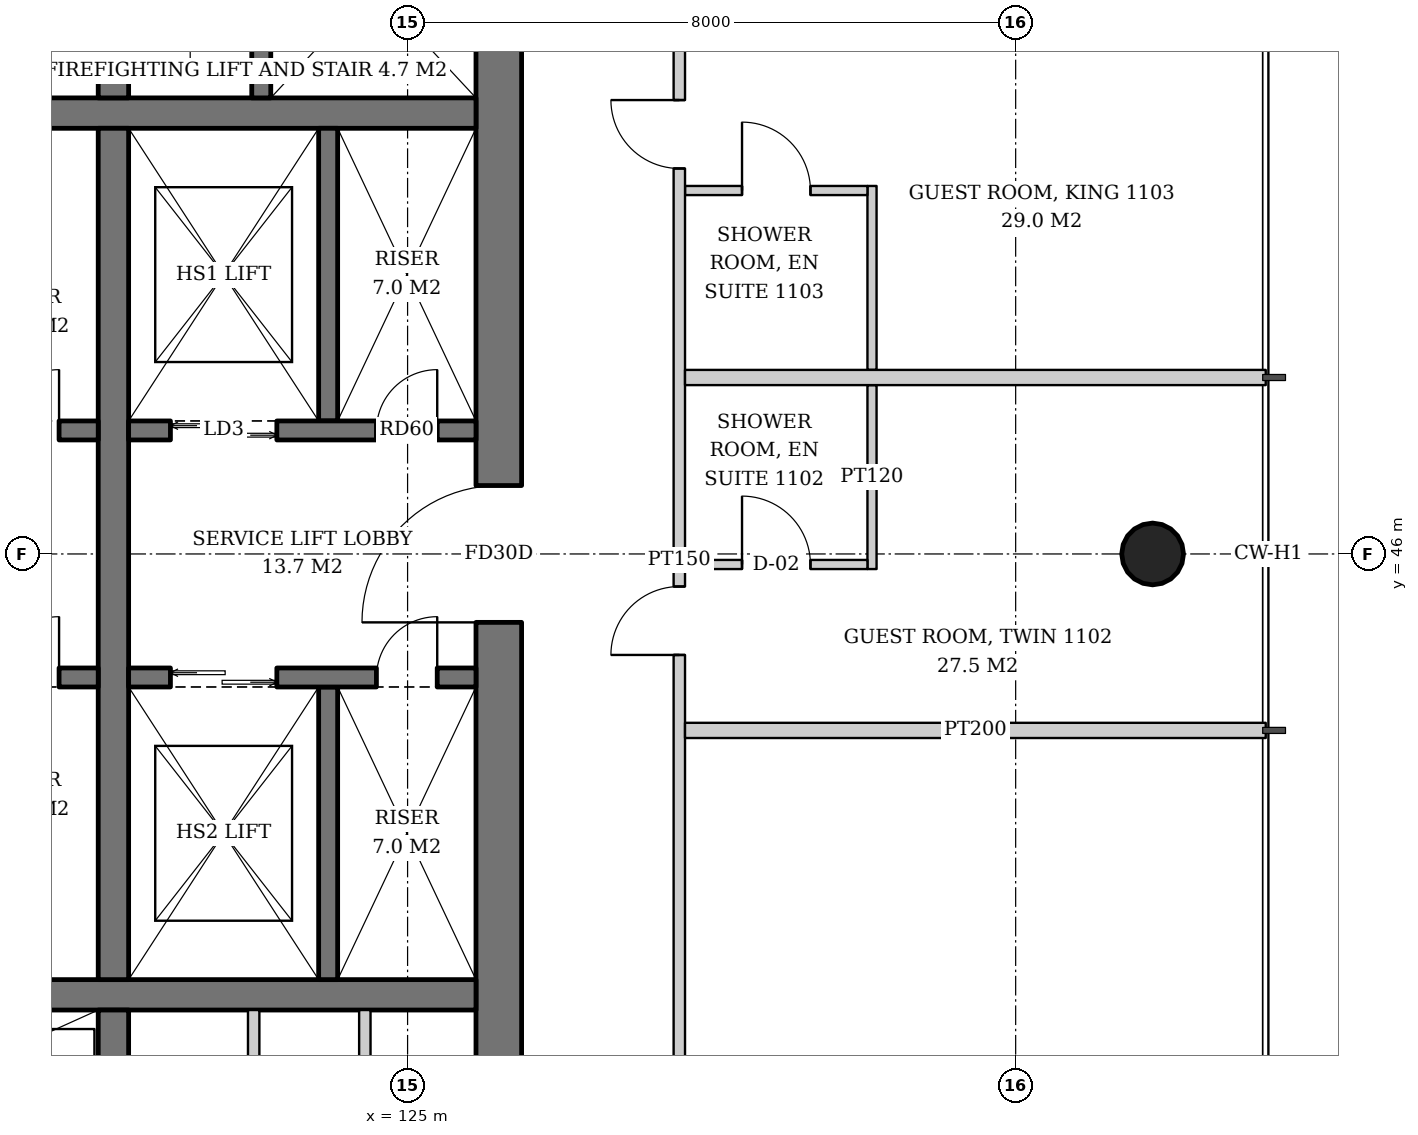
"""IFC4 building model, lengths in metres.
Left out: names, types, materials, properties, quantities, classifications, styles, units other than length and angle.
Written with IfcOpenShell. Run it as: python <this file> out.ifc"""

import sys

from ifc_helpers import new_model, si_unit, direction, frame, frame_2d, origin, origin_2d, place, context, subcontext, project, spatial, rectangle, hollow_circle, extrude, element, fill, save


model = new_model("IFC4")
c1 = context("Model", 3, precision=1e-05, world=origin(), true_north=direction((0.0, 1.0)))
c2 = subcontext(c1, "Body", "Model", "MODEL_VIEW")
j1 = project(units=[si_unit("LENGTHUNIT", "METRE"), si_unit("PLANEANGLEUNIT", "RADIAN")], contexts=[c1])
p1 = place(None, origin())
s1 = spatial("IfcSite", under=j1, at=p1, CompositionType="ELEMENT")
p2 = place(p1, origin())
s2 = spatial("IfcBuilding", under=s1, at=p2, CompositionType="ELEMENT")
p3 = place(p2, frame((0.0, 0.0, 47.6)))
s3 = spatial("IfcBuildingStorey", under=s2, at=p3, CompositionType="ELEMENT", Elevation=47.6)
p4 = place(p3, frame((134.854, 46.0, 0.0), z_axis=(-0.043072300418, 0.0, 0.999071957837), x_axis=(0.0, -1.0, 0.0)))
e1 = element("IfcColumn", 1, at=p4, inside=s3, PredefinedType="COLUMN", context=c2, shape_type="SweptSolid", body=[
    extrude(hollow_circle(Radius=0.406, WallThickness=0.03, at=origin_2d()), origin(), (0.0, 0.0, 1.0), 3.803),
])
p5 = place(p3, frame((126.2, 37.1, 0.0), z_axis=(0.0, 0.0, 1.0), x_axis=(0.0, 1.0, 0.0)))
e2 = element("IfcWall", 2, at=p5, inside=s3, PredefinedType="SHEAR", context=c2, shape_type="SweptSolid", body=[
    extrude(rectangle(XDim=17.8, YDim=0.6, at=frame_2d((8.9, 0.0))), origin(), (0.0, 0.0, 1.0), 3.8),
])
p6 = place(p5, frame((8.0, 0.0, 0.0)))
e3 = element("IfcOpeningElement", 3, at=p6, cuts=e2, PredefinedType="OPENING", context=c2, shape_type="SweptSolid", body=[
    extrude(rectangle(XDim=1.8, YDim=2.4, at=frame_2d((0.9, 1.2))), frame((0.0, 0.31, 0.0), z_axis=(0.0, -1.0, 0.0), x_axis=(1.0, 0.0, 0.0)), (0.0, 0.0, 1.0), 0.62),
])
for number, where, z_axis, x_axis in (
    (4, (108.1, 40.2, 0.0), (0.0, 0.0, 1.0), (1.0, 0.0, 0.0)),
    (5, (108.1, 51.8, 0.0), (0.0, 0.0, 1.0), (1.0, 0.0, 0.0)),
):
    element("IfcWall", number, at=place(p3, frame(where, z_axis=z_axis, x_axis=x_axis)), inside=s3, PredefinedType="SHEAR", context=c2, shape_type="SweptSolid", body=[
        extrude(rectangle(XDim=17.8, YDim=0.4, at=frame_2d((8.9, 0.0))), origin(), (0.0, 0.0, 1.0), 3.8),
    ])
p7 = place(p3, frame((121.13, 37.1, 0.0), z_axis=(0.0, 0.0, 1.0), x_axis=(0.0, 1.0, 0.0)))
e6 = element("IfcWall", 6, at=p7, inside=s3, PredefinedType="SHEAR", context=c2, shape_type="SweptSolid", body=[
    extrude(rectangle(XDim=2.9, YDim=0.4, at=frame_2d((1.45, 0.0))), origin(), (0.0, 0.0, 1.0), 3.8),
])
p8 = place(p3, frame((121.13, 40.4, 0.0), z_axis=(0.0, 0.0, 1.0), x_axis=(0.0, 1.0, 0.0)))
e7 = element("IfcWall", 7, at=p8, inside=s3, PredefinedType="SHEAR", context=c2, shape_type="SweptSolid", body=[
    extrude(rectangle(XDim=11.2, YDim=0.4, at=frame_2d((5.6, 0.0))), origin(), (0.0, 0.0, 1.0), 3.8),
])
p9 = place(p3, frame((121.13, 52.0, 0.0), z_axis=(0.0, 0.0, 1.0), x_axis=(0.0, 1.0, 0.0)))
e8 = element("IfcWall", 8, at=p9, inside=s3, PredefinedType="SHEAR", context=c2, shape_type="SweptSolid", body=[
    extrude(rectangle(XDim=2.9, YDim=0.4, at=frame_2d((1.45, 0.0))), origin(), (0.0, 0.0, 1.0), 3.8),
])
p10 = place(p9, frame((0.3, 0.0, 0.0)))
e9 = element("IfcOpeningElement", 9, at=p10, cuts=e8, PredefinedType="OPENING", context=c2, shape_type="SweptSolid", body=[
    extrude(rectangle(XDim=1.0, YDim=2.1, at=frame_2d((0.5, 1.05))), frame((0.0, 0.21, 0.0), z_axis=(0.0, -1.0, 0.0), x_axis=(1.0, 0.0, 0.0)), (0.0, 0.0, 1.0), 0.42),
])
p11 = place(p3, frame((123.075, 52.0, 0.0), z_axis=(0.0, 0.0, 1.0), x_axis=(0.0, 1.0, 0.0)))
e10 = element("IfcWall", 10, at=p11, inside=s3, PredefinedType="SHEAR", context=c2, shape_type="SweptSolid", body=[
    extrude(rectangle(XDim=2.9, YDim=0.25, at=frame_2d((1.45, 0.0))), origin(), (0.0, 0.0, 1.0), 3.8),
])
p12 = place(p11, frame((0.8, 0.0, 0.0)))
e11 = element("IfcOpeningElement", 11, at=p12, cuts=e10, PredefinedType="OPENING", context=c2, shape_type="SweptSolid", body=[
    extrude(rectangle(XDim=1.3, YDim=2.2, at=frame_2d((0.65, 1.1))), frame((0.0, 0.135, 0.0), z_axis=(0.0, -1.0, 0.0), x_axis=(1.0, 0.0, 0.0)), (0.0, 0.0, 1.0), 0.27),
])
p13 = place(p3, frame((108.1, 47.625, 0.0), z_axis=(0.0, 0.0, 1.0), x_axis=(1.0, 0.0, 0.0)))
e12 = element("IfcWall", 12, at=p13, inside=s3, PredefinedType="SHEAR", context=c2, shape_type="SweptSolid", body=[
    extrude(rectangle(XDim=12.83, YDim=0.25, at=frame_2d((6.415, 0.0))), origin(), (0.0, 0.0, 1.0), 3.8),
])
p14 = place(p13, frame((0.7, 0.0, 0.0)))
e13 = element("IfcOpeningElement", 13, at=p14, cuts=e12, PredefinedType="OPENING", context=c2, shape_type="SweptSolid", body=[
    extrude(rectangle(XDim=1.1, YDim=2.2, at=frame_2d((0.55, 1.1))), frame((0.0, 0.135, 0.0), z_axis=(0.0, -1.0, 0.0), x_axis=(1.0, 0.0, 0.0)), (0.0, 0.0, 1.0), 0.27),
])
p15 = place(p13, frame((3.45, 0.0, 0.0)))
e14 = element("IfcOpeningElement", 14, at=p15, cuts=e12, PredefinedType="OPENING", context=c2, shape_type="SweptSolid", body=[
    extrude(rectangle(XDim=1.1, YDim=2.2, at=frame_2d((0.55, 1.1))), frame((0.0, 0.135, 0.0), z_axis=(0.0, -1.0, 0.0), x_axis=(1.0, 0.0, 0.0)), (0.0, 0.0, 1.0), 0.27),
])
p16 = place(p13, frame((6.2, 0.0, 0.0)))
e15 = element("IfcOpeningElement", 15, at=p16, cuts=e12, PredefinedType="OPENING", context=c2, shape_type="SweptSolid", body=[
    extrude(rectangle(XDim=1.1, YDim=2.2, at=frame_2d((0.55, 1.1))), frame((0.0, 0.135, 0.0), z_axis=(0.0, -1.0, 0.0), x_axis=(1.0, 0.0, 0.0)), (0.0, 0.0, 1.0), 0.27),
])
p17 = place(p13, frame((8.95, 0.0, 0.0)))
e16 = element("IfcOpeningElement", 16, at=p17, cuts=e12, PredefinedType="OPENING", context=c2, shape_type="SweptSolid", body=[
    extrude(rectangle(XDim=1.1, YDim=2.2, at=frame_2d((0.55, 1.1))), frame((0.0, 0.135, 0.0), z_axis=(0.0, -1.0, 0.0), x_axis=(1.0, 0.0, 0.0)), (0.0, 0.0, 1.0), 0.27),
])
p18 = place(p13, frame((11.515, 0.0, 0.0)))
e17 = element("IfcOpeningElement", 17, at=p18, cuts=e12, PredefinedType="OPENING", context=c2, shape_type="SweptSolid", body=[
    extrude(rectangle(XDim=0.8, YDim=2.0, at=frame_2d((0.4, 1.0))), frame((0.0, 0.135, 0.0), z_axis=(0.0, -1.0, 0.0), x_axis=(1.0, 0.0, 0.0)), (0.0, 0.0, 1.0), 0.27),
])
p19 = place(p3, frame((108.1, 44.375, 0.0), z_axis=(0.0, 0.0, 1.0), x_axis=(1.0, 0.0, 0.0)))
e18 = element("IfcWall", 18, at=p19, inside=s3, PredefinedType="SHEAR", context=c2, shape_type="SweptSolid", body=[
    extrude(rectangle(XDim=12.83, YDim=0.25, at=frame_2d((6.415, 0.0))), origin(), (0.0, 0.0, 1.0), 3.8),
])
p20 = place(p19, frame((0.7, 0.0, 0.0)))
e19 = element("IfcOpeningElement", 19, at=p20, cuts=e18, PredefinedType="OPENING", context=c2, shape_type="SweptSolid", body=[
    extrude(rectangle(XDim=1.1, YDim=2.2, at=frame_2d((0.55, 1.1))), frame((0.0, 0.135, 0.0), z_axis=(0.0, -1.0, 0.0), x_axis=(1.0, 0.0, 0.0)), (0.0, 0.0, 1.0), 0.27),
])
p21 = place(p19, frame((3.45, 0.0, 0.0)))
e20 = element("IfcOpeningElement", 20, at=p21, cuts=e18, PredefinedType="OPENING", context=c2, shape_type="SweptSolid", body=[
    extrude(rectangle(XDim=1.1, YDim=2.2, at=frame_2d((0.55, 1.1))), frame((0.0, 0.135, 0.0), z_axis=(0.0, -1.0, 0.0), x_axis=(1.0, 0.0, 0.0)), (0.0, 0.0, 1.0), 0.27),
])
p22 = place(p19, frame((6.2, 0.0, 0.0)))
e21 = element("IfcOpeningElement", 21, at=p22, cuts=e18, PredefinedType="OPENING", context=c2, shape_type="SweptSolid", body=[
    extrude(rectangle(XDim=1.1, YDim=2.2, at=frame_2d((0.55, 1.1))), frame((0.0, 0.135, 0.0), z_axis=(0.0, -1.0, 0.0), x_axis=(1.0, 0.0, 0.0)), (0.0, 0.0, 1.0), 0.27),
])
p23 = place(p19, frame((9.0, 0.0, 0.0)))
e22 = element("IfcOpeningElement", 22, at=p23, cuts=e18, PredefinedType="OPENING", context=c2, shape_type="SweptSolid", body=[
    extrude(rectangle(XDim=1.0, YDim=2.1, at=frame_2d((0.5, 1.05))), frame((0.0, 0.135, 0.0), z_axis=(0.0, -1.0, 0.0), x_axis=(1.0, 0.0, 0.0)), (0.0, 0.0, 1.0), 0.27),
])
p24 = place(p19, frame((11.515, 0.0, 0.0)))
e23 = element("IfcOpeningElement", 23, at=p24, cuts=e18, PredefinedType="OPENING", context=c2, shape_type="SweptSolid", body=[
    extrude(rectangle(XDim=0.8, YDim=2.0, at=frame_2d((0.4, 1.0))), frame((0.0, 0.135, 0.0), z_axis=(0.0, -1.0, 0.0), x_axis=(1.0, 0.0, 0.0)), (0.0, 0.0, 1.0), 0.27),
])
p25 = place(p3, frame((123.955, 47.75, 0.0), z_axis=(0.0, 0.0, 1.0), x_axis=(0.0, 1.0, 0.0)))
e24 = element("IfcWall", 24, at=p25, inside=s3, PredefinedType="SHEAR", context=c2, shape_type="SweptSolid", body=[
    extrude(rectangle(XDim=3.85, YDim=0.25, at=frame_2d((1.925, 0.0))), origin(), (0.0, 0.0, 1.0), 3.8),
])
p26 = place(p3, frame((121.33, 47.625, 0.0), z_axis=(0.0, 0.0, 1.0), x_axis=(1.0, 0.0, 0.0)))
e25 = element("IfcWall", 25, at=p26, inside=s3, PredefinedType="SHEAR", context=c2, shape_type="SweptSolid", body=[
    extrude(rectangle(XDim=4.57, YDim=0.25, at=frame_2d((2.285, 0.0))), origin(), (0.0, 0.0, 1.0), 3.8),
])
p27 = place(p26, frame((0.55, 0.0, 0.0)))
e26 = element("IfcOpeningElement", 26, at=p27, cuts=e25, PredefinedType="OPENING", context=c2, shape_type="SweptSolid", body=[
    extrude(rectangle(XDim=1.4, YDim=2.4, at=frame_2d((0.7, 1.2))), frame((0.0, 0.135, 0.0), z_axis=(0.0, -1.0, 0.0), x_axis=(1.0, 0.0, 0.0)), (0.0, 0.0, 1.0), 0.27),
])
p28 = place(p26, frame((3.26, 0.0, 0.0)))
e27 = element("IfcOpeningElement", 27, at=p28, cuts=e25, PredefinedType="OPENING", context=c2, shape_type="SweptSolid", body=[
    extrude(rectangle(XDim=0.8, YDim=2.0, at=frame_2d((0.4, 1.0))), frame((0.0, 0.135, 0.0), z_axis=(0.0, -1.0, 0.0), x_axis=(1.0, 0.0, 0.0)), (0.0, 0.0, 1.0), 0.27),
])
p29 = place(p3, frame((123.955, 44.25, 0.0), z_axis=(0.0, 0.0, 1.0), x_axis=(0.0, -1.0, 0.0)))
e28 = element("IfcWall", 28, at=p29, inside=s3, PredefinedType="SHEAR", context=c2, shape_type="SweptSolid", body=[
    extrude(rectangle(XDim=3.85, YDim=0.25, at=frame_2d((1.925, 0.0))), origin(), (0.0, 0.0, 1.0), 3.8),
])
p30 = place(p3, frame((121.33, 44.375, 0.0), z_axis=(0.0, 0.0, 1.0), x_axis=(1.0, 0.0, 0.0)))
e29 = element("IfcWall", 29, at=p30, inside=s3, PredefinedType="SHEAR", context=c2, shape_type="SweptSolid", body=[
    extrude(rectangle(XDim=4.57, YDim=0.25, at=frame_2d((2.285, 0.0))), origin(), (0.0, 0.0, 1.0), 3.8),
])
p31 = place(p30, frame((0.55, 0.0, 0.0)))
e30 = element("IfcOpeningElement", 30, at=p31, cuts=e29, PredefinedType="OPENING", context=c2, shape_type="SweptSolid", body=[
    extrude(rectangle(XDim=1.4, YDim=2.4, at=frame_2d((0.7, 1.2))), frame((0.0, 0.135, 0.0), z_axis=(0.0, -1.0, 0.0), x_axis=(1.0, 0.0, 0.0)), (0.0, 0.0, 1.0), 0.27),
])
p32 = place(p30, frame((3.26, 0.0, 0.0)))
e31 = element("IfcOpeningElement", 31, at=p32, cuts=e29, PredefinedType="OPENING", context=c2, shape_type="SweptSolid", body=[
    extrude(rectangle(XDim=0.8, YDim=2.0, at=frame_2d((0.4, 1.0))), frame((0.0, 0.135, 0.0), z_axis=(0.0, -1.0, 0.0), x_axis=(1.0, 0.0, 0.0)), (0.0, 0.0, 1.0), 0.27),
])
for number, where, z_axis, x_axis in (
    (32, (122.975, 37.1, 0.0), (0.0, 0.0, 1.0), (0.0, 1.0, 0.0)),
    (33, (124.438, 37.1, 0.0), (0.0, 0.0, 1.0), (0.0, 1.0, 0.0)),
):
    element("IfcWall", number, at=place(p3, frame(where, z_axis=z_axis, x_axis=x_axis)), inside=s3, PredefinedType="SOLIDWALL", context=c2, shape_type="SweptSolid", body=[
        extrude(rectangle(XDim=2.9, YDim=0.15, at=frame_2d((1.45, 0.0))), origin(), (0.0, 0.0, 1.0), 3.6),
    ])
p33 = place(p3, frame((131.11, 45.802, 0.0), z_axis=(0.0, 0.0, 1.0), x_axis=(0.0, 1.0, 0.0)))
e34 = element("IfcWall", 34, at=p33, inside=s3, PredefinedType="PARTITIONING", context=c2, shape_type="SweptSolid", body=[
    extrude(rectangle(XDim=2.42, YDim=0.12, at=frame_2d((1.21, 0.0))), origin(), (0.0, 0.0, 1.0), 2.847),
])
p34 = place(p3, frame((128.65, 45.861, 0.0), z_axis=(0.0, 0.0, 1.0), x_axis=(1.0, 0.0, 0.0)))
e35 = element("IfcWall", 35, at=p34, inside=s3, PredefinedType="PARTITIONING", context=c2, shape_type="SweptSolid", body=[
    extrude(rectangle(XDim=2.4, YDim=0.12, at=frame_2d((1.2, 0.0))), origin(), (0.0, 0.0, 1.0), 2.847),
])
p35 = place(p34, frame((0.75, 0.0, 0.0)))
e36 = element("IfcOpeningElement", 36, at=p35, cuts=e35, PredefinedType="OPENING", context=c2, shape_type="SweptSolid", body=[
    extrude(rectangle(XDim=0.9, YDim=2.1, at=frame_2d((0.45, 1.05))), frame((0.0, 0.07, 0.0), z_axis=(0.0, -1.0, 0.0), x_axis=(1.0, 0.0, 0.0)), (0.0, 0.0, 1.0), 0.14),
])
p36 = place(p3, frame((131.11, 48.421, 0.0), z_axis=(0.0, 0.0, 1.0), x_axis=(0.0, 1.0, 0.0)))
e37 = element("IfcWall", 37, at=p36, inside=s3, PredefinedType="PARTITIONING", context=c2, shape_type="SweptSolid", body=[
    extrude(rectangle(XDim=2.42, YDim=0.12, at=frame_2d((1.21, 0.0))), origin(), (0.0, 0.0, 1.0), 2.847),
])
p37 = place(p3, frame((128.65, 50.781, 0.0), z_axis=(0.0, 0.0, 1.0), x_axis=(1.0, 0.0, 0.0)))
e38 = element("IfcWall", 38, at=p37, inside=s3, PredefinedType="PARTITIONING", context=c2, shape_type="SweptSolid", body=[
    extrude(rectangle(XDim=2.4, YDim=0.12, at=frame_2d((1.2, 0.0))), origin(), (0.0, 0.0, 1.0), 3.6),
])
p38 = place(p37, frame((0.75, 0.0, 0.0)))
e39 = element("IfcOpeningElement", 39, at=p38, cuts=e38, PredefinedType="OPENING", context=c2, shape_type="SweptSolid", body=[
    extrude(rectangle(XDim=0.9, YDim=2.1, at=frame_2d((0.45, 1.05))), frame((0.0, 0.07, 0.0), z_axis=(0.0, -1.0, 0.0), x_axis=(1.0, 0.0, 0.0)), (0.0, 0.0, 1.0), 0.14),
])
p39 = place(p3, frame((128.575, 34.35, 0.0), z_axis=(0.0, 0.0, 1.0), x_axis=(0.0, 1.0, 0.0)))
e40 = element("IfcWall", 40, at=p39, inside=s3, PredefinedType="PARTITIONING", context=c2, shape_type="SweptSolid", body=[
    extrude(rectangle(XDim=23.15, YDim=0.15, at=frame_2d((11.575, 0.0))), origin(), (0.0, 0.0, 1.0), 2.8),
])
p40 = place(p39, frame((1.918, 0.0, 0.0)))
e41 = element("IfcOpeningElement", 41, at=p40, cuts=e40, PredefinedType="OPENING", context=c2, shape_type="SweptSolid", body=[
    extrude(rectangle(XDim=0.9, YDim=2.1, at=frame_2d((0.45, 1.05))), frame((0.0, 0.085, 0.0), z_axis=(0.0, -1.0, 0.0), x_axis=(1.0, 0.0, 0.0)), (0.0, 0.0, 1.0), 0.17),
])
p41 = place(p39, frame((10.322, 0.0, 0.0)))
e42 = element("IfcOpeningElement", 42, at=p41, cuts=e40, PredefinedType="OPENING", context=c2, shape_type="SweptSolid", body=[
    extrude(rectangle(XDim=0.9, YDim=2.1, at=frame_2d((0.45, 1.05))), frame((0.0, 0.085, 0.0), z_axis=(0.0, -1.0, 0.0), x_axis=(1.0, 0.0, 0.0)), (0.0, 0.0, 1.0), 0.17),
])
p42 = place(p39, frame((16.721, 0.0, 0.0)))
e43 = element("IfcOpeningElement", 43, at=p42, cuts=e40, PredefinedType="OPENING", context=c2, shape_type="SweptSolid", body=[
    extrude(rectangle(XDim=0.9, YDim=2.1, at=frame_2d((0.45, 1.05))), frame((0.0, 0.085, 0.0), z_axis=(0.0, -1.0, 0.0), x_axis=(1.0, 0.0, 0.0)), (0.0, 0.0, 1.0), 0.17),
])
for number, where, z_axis, x_axis in (
    (44, (128.65, 43.678, 0.0), (0.0, 0.0, 1.0), (1.0, 0.0, 0.0)),
    (45, (128.65, 48.322, 0.0), (0.0, 0.0, 1.0), (1.0, 0.0, 0.0)),
):
    element("IfcWall", number, at=place(p3, frame(where, z_axis=z_axis, x_axis=x_axis)), inside=s3, PredefinedType="PARTITIONING", context=c2, shape_type="SweptSolid", body=[
        extrude(rectangle(XDim=7.64, YDim=0.2, at=frame_2d((3.82, 0.0))), origin(), (0.0, 0.0, 1.0), 3.05),
    ])
p43 = place(p18, origin())
e46 = element("IfcDoor", 46, at=p43, inside=s3, OperationType="SINGLE_SWING_RIGHT", PredefinedType="DOOR", context=c2, shape_type="SweptSolid", body=[
    extrude(rectangle(XDim=0.8, YDim=2.0, at=frame_2d((0.4, 1.0))), frame((0.0, 0.025, 0.0), z_axis=(0.0, -1.0, 0.0), x_axis=(1.0, 0.0, 0.0)), (0.0, 0.0, 1.0), 0.05),
])
fill(e17, e46)
p44 = place(p24, origin())
e47 = element("IfcDoor", 47, at=p44, inside=s3, OperationType="SINGLE_SWING_RIGHT", PredefinedType="DOOR", context=c2, shape_type="SweptSolid", body=[
    extrude(rectangle(XDim=0.8, YDim=2.0, at=frame_2d((0.4, 1.0))), frame((0.0, 0.025, 0.0), z_axis=(0.0, -1.0, 0.0), x_axis=(1.0, 0.0, 0.0)), (0.0, 0.0, 1.0), 0.05),
])
fill(e23, e47)
p45 = place(p27, origin())
e48 = element("IfcDoor", 48, at=p45, inside=s3, OperationType="DOUBLE_DOOR_SLIDING", PredefinedType="DOOR", context=c2, shape_type="SweptSolid", body=[
    extrude(rectangle(XDim=1.4, YDim=2.4, at=frame_2d((0.7, 1.2))), frame((0.0, 0.025, 0.0), z_axis=(0.0, -1.0, 0.0), x_axis=(1.0, 0.0, 0.0)), (0.0, 0.0, 1.0), 0.05),
])
fill(e26, e48)
p46 = place(p28, origin())
e49 = element("IfcDoor", 49, at=p46, inside=s3, OperationType="SINGLE_SWING_RIGHT", PredefinedType="DOOR", context=c2, shape_type="SweptSolid", body=[
    extrude(rectangle(XDim=0.8, YDim=2.0, at=frame_2d((0.4, 1.0))), frame((0.0, 0.025, 0.0), z_axis=(0.0, -1.0, 0.0), x_axis=(1.0, 0.0, 0.0)), (0.0, 0.0, 1.0), 0.05),
])
fill(e27, e49)
p47 = place(p31, origin())
e50 = element("IfcDoor", 50, at=p47, inside=s3, OperationType="DOUBLE_DOOR_SLIDING", PredefinedType="DOOR", context=c2, shape_type="SweptSolid", body=[
    extrude(rectangle(XDim=1.4, YDim=2.4, at=frame_2d((0.7, 1.2))), frame((0.0, 0.025, 0.0), z_axis=(0.0, -1.0, 0.0), x_axis=(1.0, 0.0, 0.0)), (0.0, 0.0, 1.0), 0.05),
])
fill(e30, e50)
p48 = place(p32, origin())
e51 = element("IfcDoor", 51, at=p48, inside=s3, OperationType="SINGLE_SWING_RIGHT", PredefinedType="DOOR", context=c2, shape_type="SweptSolid", body=[
    extrude(rectangle(XDim=0.8, YDim=2.0, at=frame_2d((0.4, 1.0))), frame((0.0, 0.025, 0.0), z_axis=(0.0, -1.0, 0.0), x_axis=(1.0, 0.0, 0.0)), (0.0, 0.0, 1.0), 0.05),
])
fill(e31, e51)
p49 = place(p10, origin())
e52 = element("IfcDoor", 52, at=p49, inside=s3, OperationType="SINGLE_SWING_LEFT", PredefinedType="DOOR", context=c2, shape_type="SweptSolid", body=[
    extrude(rectangle(XDim=1.0, YDim=2.1, at=frame_2d((0.5, 1.05))), frame((0.0, 0.025, 0.0), z_axis=(0.0, -1.0, 0.0), x_axis=(1.0, 0.0, 0.0)), (0.0, 0.0, 1.0), 0.05),
])
fill(e9, e52)
p50 = place(p6, origin())
e53 = element("IfcDoor", 53, at=p50, inside=s3, OperationType="DOUBLE_DOOR_SINGLE_SWING", PredefinedType="DOOR", context=c2, shape_type="SweptSolid", body=[
    extrude(rectangle(XDim=1.8, YDim=2.4, at=frame_2d((0.9, 1.2))), frame((0.0, 0.025, 0.0), z_axis=(0.0, -1.0, 0.0), x_axis=(1.0, 0.0, 0.0)), (0.0, 0.0, 1.0), 0.05),
])
fill(e3, e53)
p51 = place(p35, origin())
e54 = element("IfcDoor", 54, at=p51, inside=s3, OperationType="SINGLE_SWING_LEFT", PredefinedType="DOOR", context=c2, shape_type="SweptSolid", body=[
    extrude(rectangle(XDim=0.9, YDim=2.1, at=frame_2d((0.45, 1.05))), frame((0.0, 0.025, 0.0), z_axis=(0.0, -1.0, 0.0), x_axis=(1.0, 0.0, 0.0)), (0.0, 0.0, 1.0), 0.05),
])
fill(e36, e54)
p52 = place(p38, origin())
e55 = element("IfcDoor", 55, at=p52, inside=s3, OperationType="SINGLE_SWING_LEFT", PredefinedType="DOOR", context=c2, shape_type="SweptSolid", body=[
    extrude(rectangle(XDim=0.9, YDim=2.1, at=frame_2d((0.45, 1.05))), frame((0.0, 0.025, 0.0), z_axis=(0.0, -1.0, 0.0), x_axis=(1.0, 0.0, 0.0)), (0.0, 0.0, 1.0), 0.05),
])
fill(e39, e55)
p53 = place(p41, origin())
e56 = element("IfcDoor", 56, at=p53, inside=s3, OperationType="SINGLE_SWING_LEFT", PredefinedType="DOOR", context=c2, shape_type="SweptSolid", body=[
    extrude(rectangle(XDim=0.9, YDim=2.1, at=frame_2d((0.45, 1.05))), frame((0.0, 0.025, 0.0), z_axis=(0.0, -1.0, 0.0), x_axis=(1.0, 0.0, 0.0)), (0.0, 0.0, 1.0), 0.05),
])
fill(e42, e56)
p54 = place(p42, origin())
e57 = element("IfcDoor", 57, at=p54, inside=s3, OperationType="SINGLE_SWING_RIGHT", PredefinedType="DOOR", context=c2, shape_type="SweptSolid", body=[
    extrude(rectangle(XDim=0.9, YDim=2.1, at=frame_2d((0.45, 1.05))), frame((0.0, 0.025, 0.0), z_axis=(0.0, -1.0, 0.0), x_axis=(1.0, 0.0, 0.0)), (0.0, 0.0, 1.0), 0.05),
])
fill(e43, e57)
save(model, sys.argv[1])
